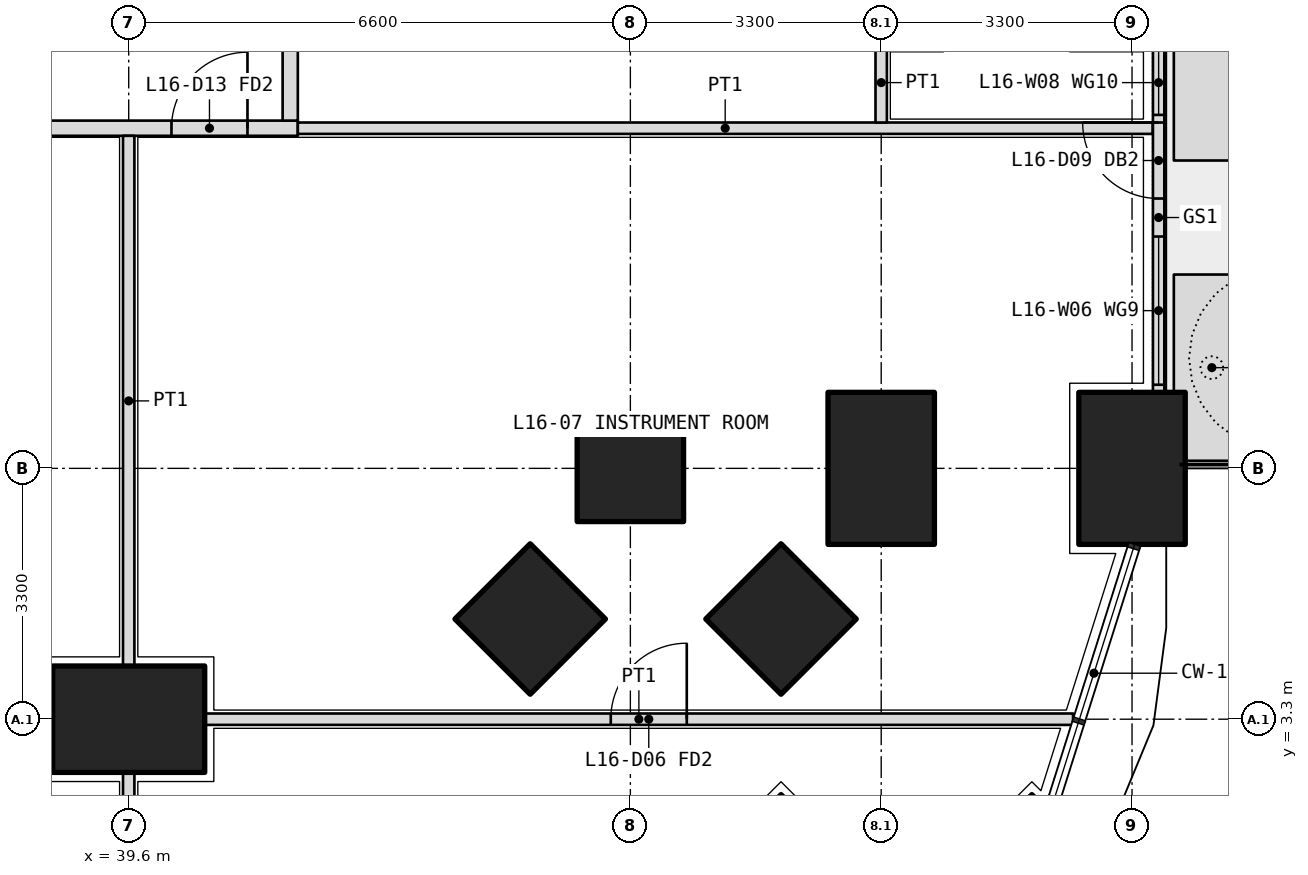
"""IFC4 building model, lengths in metres.
Left out: names, types, materials, properties, quantities, classifications, styles, units other than length and angle.
Written with IfcOpenShell. Run it as: python <this file> out.ifc"""

import sys

from ifc_helpers import new_model, si_unit, direction, frame, frame_2d, origin, origin_2d, place, context, subcontext, project, spatial, polyline, rectangle, outline, extrude, element, fill, save


model = new_model("IFC4")
c1 = context("Model", 3, precision=1e-05, world=origin(), true_north=direction((0.0, 1.0)))
c2 = subcontext(c1, "Body", "Model", "MODEL_VIEW")
j1 = project(units=[si_unit("LENGTHUNIT", "METRE"), si_unit("PLANEANGLEUNIT", "RADIAN")], contexts=[c1])
p1 = place(None, origin())
s1 = spatial("IfcSite", under=j1, at=p1, CompositionType="ELEMENT")
p2 = place(p1, origin())
s2 = spatial("IfcBuilding", under=s1, at=p2, CompositionType="ELEMENT")
p3 = place(p2, frame((0.0, 0.0, 71.7)))
s3 = spatial("IfcBuildingStorey", under=s2, at=p3, CompositionType="ELEMENT", Elevation=71.7)
p4 = place(p3, frame((51.482, 1.318, 0.0), z_axis=(0.0, 0.0, 1.0), x_axis=(0.707106781187, 0.707106781187, 0.0)))
e1 = element("IfcColumn", 1, at=p4, inside=s3, PredefinedType="COLUMN", context=c2, shape_type="SweptSolid", body=[
    extrude(rectangle(XDim=1.4, YDim=1.4, at=origin_2d()), origin(), (0.0, 0.0, 1.0), 4.2),
])
p5 = place(p3, frame((52.8, 6.6, 0.0), z_axis=(0.0, 0.0, 1.0), x_axis=(0.0, 1.0, 0.0)))
e2 = element("IfcColumn", 2, at=p5, inside=s3, PredefinedType="COLUMN", context=c2, shape_type="SweptSolid", body=[
    extrude(rectangle(XDim=2.0, YDim=1.4, at=origin_2d()), origin(), (0.0, 0.0, 1.0), 4.2),
])
for number, where, z_axis, x_axis in (
    (3, (46.2, 6.6, 0.0), (0.0, 0.0, 1.0), (1.0, 0.0, 0.0)),
    (4, (48.182, 1.318, 0.0), (0.0, 0.0, 1.0), (0.707, 0.707, 0.0)),
):
    element("IfcColumn", number, at=place(p3, frame(where, z_axis=z_axis, x_axis=x_axis)), inside=s3, PredefinedType="COLUMN", context=c2, shape_type="SweptSolid", body=[
        extrude(rectangle(XDim=1.4, YDim=1.4, at=origin_2d()), origin(), (0.0, 0.0, 1.0), 4.2),
    ])
p6 = place(p3, frame((49.5, 6.6, 0.0), z_axis=(0.0, 0.0, 1.0), x_axis=(0.0, 1.0, 0.0)))
e5 = element("IfcColumn", 5, at=p6, inside=s3, PredefinedType="COLUMN", context=c2, shape_type="SweptSolid", body=[
    extrude(rectangle(XDim=2.0, YDim=1.4, at=origin_2d()), origin(), (0.0, 0.0, 1.0), 4.2),
])
p7 = place(p3, frame((48.182, 4.618, 0.0), z_axis=(0.0, 0.0, 1.0), x_axis=(0.707106781187, 0.707106781187, 0.0)))
e6 = element("IfcColumn", 6, at=p7, inside=s3, PredefinedType="COLUMN", context=c2, shape_type="SweptSolid", body=[
    extrude(rectangle(XDim=1.4, YDim=1.4, at=origin_2d()), origin(), (0.0, 0.0, 1.0), 4.2),
])
p8 = place(p3, frame((39.6, 3.3, 0.0), z_axis=(0.0, 0.0, 1.0), x_axis=(1.0, 0.0, 0.0)))
e7 = element("IfcColumn", 7, at=p8, inside=s3, PredefinedType="COLUMN", context=c2, shape_type="SweptSolid", body=[
    extrude(rectangle(XDim=2.0, YDim=1.4, at=origin_2d()), origin(), (0.0, 0.0, 1.0), 4.2),
])
p9 = place(p3, frame((44.882, 4.618, 0.0), z_axis=(0.0, 0.0, 1.0), x_axis=(0.707106781187, 0.707106781187, 0.0)))
e8 = element("IfcColumn", 8, at=p9, inside=s3, PredefinedType="COLUMN", context=c2, shape_type="SweptSolid", body=[
    extrude(rectangle(XDim=1.4, YDim=1.4, at=origin_2d()), origin(), (0.0, 0.0, 1.0), 4.2),
])
p10 = place(p3, origin())
e9 = element("IfcWall", 9, at=p10, inside=s3, PredefinedType="USERDEFINED", context=c2, shape_type="SweptSolid", body=[
    extrude(outline(polyline([(53.35, 6.7), (54.35, 6.7), (54.35, 9.15), (53.35, 9.15), (53.35, 6.7)]), holes=[polyline([(53.5, 6.85), (54.2, 6.85), (54.2, 9.0), (53.5, 9.0), (53.5, 6.85)])]), origin(), (0.0, 0.0, 1.0), 1.05),
])
p11 = place(p3, origin())
e10 = element("IfcWall", 10, at=p11, inside=s3, PredefinedType="USERDEFINED", context=c2, shape_type="SweptSolid", body=[
    extrude(outline(polyline([(53.35, 10.65), (54.35, 10.65), (54.35, 19.7), (53.35, 19.7), (53.35, 10.65)]), holes=[polyline([(53.5, 10.8), (54.2, 10.8), (54.2, 19.55), (53.5, 19.55), (53.5, 10.8)])]), origin(), (0.0, 0.0, 1.0), 1.05),
])
p12 = place(p3, frame((53.15, 7.6, 0.0), z_axis=(0.0, 0.0, 1.0), x_axis=(0.0, 1.0, 0.0)))
e11 = element("IfcWall", 11, at=p12, inside=s3, PredefinedType="SOLIDWALL", context=c2, shape_type="SweptSolid", body=[
    extrude(rectangle(XDim=4.6, YDim=0.15, at=frame_2d((2.3, 0.0))), origin(), (0.0, 0.0, 1.0), 2.05),
])
p13 = place(p12, frame((2.55, 0.0, 0.0)))
e12 = element("IfcOpeningElement", 12, at=p13, cuts=e11, PredefinedType="OPENING", context=c2, shape_type="SweptSolid", body=[
    extrude(rectangle(XDim=1.0, YDim=2.0, at=frame_2d((0.5, 1.0))), frame((0.0, 0.085, 0.0), z_axis=(0.0, -1.0, 0.0), x_axis=(1.0, 0.0, 0.0)), (0.0, 0.0, 1.0), 0.17),
])
p14 = place(p12, frame((0.1, 0.0, 0.1)))
e13 = element("IfcOpeningElement", 13, at=p14, cuts=e11, PredefinedType="OPENING", context=c2, shape_type="SweptSolid", body=[
    extrude(rectangle(XDim=1.95, YDim=1.65, at=frame_2d((0.975, 0.825))), frame((0.0, 0.085, 0.0), z_axis=(0.0, -1.0, 0.0), x_axis=(1.0, 0.0, 0.0)), (0.0, 0.0, 1.0), 0.17),
])
p15 = place(p12, frame((3.65, 0.0, 0.1)))
e14 = element("IfcOpeningElement", 14, at=p15, cuts=e11, PredefinedType="OPENING", context=c2, shape_type="SweptSolid", body=[
    extrude(rectangle(XDim=0.85, YDim=1.65, at=frame_2d((0.425, 0.825))), frame((0.0, 0.085, 0.0), z_axis=(0.0, -1.0, 0.0), x_axis=(1.0, 0.0, 0.0)), (0.0, 0.0, 1.0), 0.17),
])
p16 = place(p3, frame((10.975, 11.075, 0.0), z_axis=(0.0, 0.0, 1.0), x_axis=(1.0, 0.0, 0.0)))
e15 = element("IfcWall", 15, at=p16, inside=s3, PredefinedType="PARTITIONING", context=c2, shape_type="SweptSolid", body=[
    extrude(rectangle(XDim=30.85, YDim=0.2, at=frame_2d((15.425, 0.0))), origin(), (0.0, 0.0, 1.0), 2.55),
])
p17 = place(p16, frame((2.312, 0.0, 0.0)))
e16 = element("IfcOpeningElement", 16, at=p17, cuts=e15, PredefinedType="OPENING", context=c2, shape_type="SweptSolid", body=[
    extrude(rectangle(XDim=1.0, YDim=2.1, at=frame_2d((0.5, 1.05))), frame((0.0, 0.11, 0.0), z_axis=(0.0, -1.0, 0.0), x_axis=(1.0, 0.0, 0.0)), (0.0, 0.0, 1.0), 0.22),
])
p18 = place(p16, frame((11.625, 0.0, 0.0)))
e17 = element("IfcOpeningElement", 17, at=p18, cuts=e15, PredefinedType="OPENING", context=c2, shape_type="SweptSolid", body=[
    extrude(rectangle(XDim=1.0, YDim=2.1, at=frame_2d((0.5, 1.05))), frame((0.0, 0.11, 0.0), z_axis=(0.0, -1.0, 0.0), x_axis=(1.0, 0.0, 0.0)), (0.0, 0.0, 1.0), 0.22),
])
p19 = place(p16, frame((23.075, 0.0, 0.0)))
e18 = element("IfcOpeningElement", 18, at=p19, cuts=e15, PredefinedType="OPENING", context=c2, shape_type="SweptSolid", body=[
    extrude(rectangle(XDim=1.2, YDim=2.1, at=frame_2d((0.6, 1.05))), frame((0.0, 0.11, 0.0), z_axis=(0.0, -1.0, 0.0), x_axis=(1.0, 0.0, 0.0)), (0.0, 0.0, 1.0), 0.22),
])
p20 = place(p16, frame((29.188, 0.0, 0.0)))
e19 = element("IfcOpeningElement", 19, at=p20, cuts=e15, PredefinedType="OPENING", context=c2, shape_type="SweptSolid", body=[
    extrude(rectangle(XDim=1.0, YDim=2.1, at=frame_2d((0.5, 1.05))), frame((0.0, 0.11, 0.0), z_axis=(0.0, -1.0, 0.0), x_axis=(1.0, 0.0, 0.0)), (0.0, 0.0, 1.0), 0.22),
])
p21 = place(p3, frame((41.725, 11.175, 0.0), z_axis=(0.0, 0.0, 1.0), x_axis=(0.0, 1.0, 0.0)))
e20 = element("IfcWall", 20, at=p21, inside=s3, PredefinedType="PARTITIONING", context=c2, shape_type="SweptSolid", body=[
    extrude(rectangle(XDim=23.85, YDim=0.2, at=frame_2d((11.925, 0.0))), origin(), (0.0, 0.0, 1.0), 2.55),
])
p22 = place(p21, frame((3.762, 0.0, 0.0)))
e21 = element("IfcOpeningElement", 21, at=p22, cuts=e20, PredefinedType="OPENING", context=c2, shape_type="SweptSolid", body=[
    extrude(rectangle(XDim=1.0, YDim=2.1, at=frame_2d((0.5, 1.05))), frame((0.0, 0.11, 0.0), z_axis=(0.0, -1.0, 0.0), x_axis=(1.0, 0.0, 0.0)), (0.0, 0.0, 1.0), 0.22),
])
p23 = place(p21, frame((9.625, 0.0, 0.0)))
e22 = element("IfcOpeningElement", 22, at=p23, cuts=e20, PredefinedType="OPENING", context=c2, shape_type="SweptSolid", body=[
    extrude(rectangle(XDim=1.0, YDim=2.1, at=frame_2d((0.5, 1.05))), frame((0.0, 0.11, 0.0), z_axis=(0.0, -1.0, 0.0), x_axis=(1.0, 0.0, 0.0)), (0.0, 0.0, 1.0), 0.22),
])
p24 = place(p21, frame((12.975, 0.0, 0.0)))
e23 = element("IfcOpeningElement", 23, at=p24, cuts=e20, PredefinedType="OPENING", context=c2, shape_type="SweptSolid", body=[
    extrude(rectangle(XDim=0.9, YDim=2.1, at=frame_2d((0.45, 1.05))), frame((0.0, 0.11, 0.0), z_axis=(0.0, -1.0, 0.0), x_axis=(1.0, 0.0, 0.0)), (0.0, 0.0, 1.0), 0.22),
])
p25 = place(p21, frame((16.275, 0.0, 0.0)))
e24 = element("IfcOpeningElement", 24, at=p25, cuts=e20, PredefinedType="OPENING", context=c2, shape_type="SweptSolid", body=[
    extrude(rectangle(XDim=1.2, YDim=2.1, at=frame_2d((0.6, 1.05))), frame((0.0, 0.11, 0.0), z_axis=(0.0, -1.0, 0.0), x_axis=(1.0, 0.0, 0.0)), (0.0, 0.0, 1.0), 0.22),
])
p26 = place(p21, frame((19.575, 0.0, 0.0)))
e25 = element("IfcOpeningElement", 25, at=p26, cuts=e20, PredefinedType="OPENING", context=c2, shape_type="SweptSolid", body=[
    extrude(rectangle(XDim=1.2, YDim=2.1, at=frame_2d((0.6, 1.05))), frame((0.0, 0.11, 0.0), z_axis=(0.0, -1.0, 0.0), x_axis=(1.0, 0.0, 0.0)), (0.0, 0.0, 1.0), 0.22),
])
p27 = place(p21, frame((22.288, 0.0, 0.0)))
e26 = element("IfcOpeningElement", 26, at=p27, cuts=e20, PredefinedType="OPENING", context=c2, shape_type="SweptSolid", body=[
    extrude(rectangle(XDim=1.2, YDim=2.1, at=frame_2d((0.6, 1.05))), frame((0.0, 0.11, 0.0), z_axis=(0.0, -1.0, 0.0), x_axis=(1.0, 0.0, 0.0)), (0.0, 0.0, 1.0), 0.22),
])
p28 = place(p3, frame((53.07, 11.075, 0.0), z_axis=(0.0, 0.0, 1.0), x_axis=(-1.0, 0.0, 0.0)))
e27 = element("IfcWall", 27, at=p28, inside=s3, PredefinedType="PARTITIONING", context=c2, shape_type="SweptSolid", body=[
    extrude(rectangle(XDim=11.245, YDim=0.15, at=frame_2d((5.623, 0.0))), origin(), (0.0, 0.0, 1.0), 3.85),
])
p29 = place(p3, frame((40.6, 3.3, 0.0), z_axis=(0.0, 0.0, 1.0), x_axis=(1.0, 0.0, 0.0)))
e28 = element("IfcWall", 28, at=p29, inside=s3, PredefinedType="PARTITIONING", context=c2, shape_type="SweptSolid", body=[
    extrude(rectangle(XDim=11.424, YDim=0.15, at=frame_2d((5.712, 0.0))), origin(), (0.0, 0.0, 1.0), 3.85),
])
p30 = place(p29, frame((5.342, 0.0, 0.0)))
e29 = element("IfcOpeningElement", 29, at=p30, cuts=e28, PredefinedType="OPENING", context=c2, shape_type="SweptSolid", body=[
    extrude(rectangle(XDim=1.0, YDim=2.1, at=frame_2d((0.5, 1.05))), frame((0.0, 0.085, 0.0), z_axis=(0.0, -1.0, 0.0), x_axis=(1.0, 0.0, 0.0)), (0.0, 0.0, 1.0), 0.17),
])
p31 = place(p3, frame((39.6, 0.7, 0.0), z_axis=(0.0, 0.0, 1.0), x_axis=(0.0, 1.0, 0.0)))
e30 = element("IfcWall", 30, at=p31, inside=s3, PredefinedType="PARTITIONING", context=c2, shape_type="SweptSolid", body=[
    extrude(rectangle(XDim=1.9, YDim=0.15, at=frame_2d((0.95, 0.0))), origin(), (0.0, 0.0, 1.0), 2.55),
])
p32 = place(p3, frame((39.6, 4.0, 0.0), z_axis=(0.0, 0.0, 1.0), x_axis=(0.0, 1.0, 0.0)))
e31 = element("IfcWall", 31, at=p32, inside=s3, PredefinedType="PARTITIONING", context=c2, shape_type="SweptSolid", body=[
    extrude(rectangle(XDim=6.975, YDim=0.15, at=frame_2d((3.488, 0.0))), origin(), (0.0, 0.0, 1.0), 2.55),
])
p33 = place(p3, frame((49.5, 11.15, 0.0), z_axis=(0.0, 0.0, 1.0), x_axis=(0.0, 1.0, 0.0)))
e32 = element("IfcWall", 32, at=p33, inside=s3, PredefinedType="PARTITIONING", context=c2, shape_type="SweptSolid", body=[
    extrude(rectangle(XDim=1.05, YDim=0.15, at=frame_2d((0.525, 0.0))), origin(), (0.0, 0.0, 1.0), 2.55),
])
p34 = place(p13, origin())
e33 = element("IfcDoor", 33, at=p34, inside=s3, OperationType="SINGLE_SWING_RIGHT", PredefinedType="DOOR", context=c2, shape_type="SweptSolid", body=[
    extrude(rectangle(XDim=1.0, YDim=2.0, at=frame_2d((0.5, 1.0))), frame((0.0, 0.025, 0.0), z_axis=(0.0, -1.0, 0.0), x_axis=(1.0, 0.0, 0.0)), (0.0, 0.0, 1.0), 0.05),
])
fill(e12, e33)
p35 = place(p14, origin())
e34 = element("IfcWindow", 34, at=p35, inside=s3, PartitioningType="SINGLE_PANEL", PredefinedType="WINDOW", context=c2, shape_type="SweptSolid", body=[
    extrude(rectangle(XDim=1.95, YDim=1.65, at=frame_2d((0.975, 0.825))), frame((0.0, 0.03, 0.0), z_axis=(0.0, -1.0, 0.0), x_axis=(1.0, 0.0, 0.0)), (0.0, 0.0, 1.0), 0.06),
])
fill(e13, e34)
p36 = place(p15, origin())
e35 = element("IfcWindow", 35, at=p36, inside=s3, PartitioningType="SINGLE_PANEL", PredefinedType="WINDOW", context=c2, shape_type="SweptSolid", body=[
    extrude(rectangle(XDim=0.85, YDim=1.65, at=frame_2d((0.425, 0.825))), frame((0.0, 0.03, 0.0), z_axis=(0.0, -1.0, 0.0), x_axis=(1.0, 0.0, 0.0)), (0.0, 0.0, 1.0), 0.06),
])
fill(e14, e35)
p37 = place(p20, origin())
e36 = element("IfcDoor", 36, at=p37, inside=s3, OperationType="SINGLE_SWING_RIGHT", PredefinedType="DOOR", context=c2, shape_type="SweptSolid", body=[
    extrude(rectangle(XDim=1.0, YDim=2.1, at=frame_2d((0.5, 1.05))), frame((0.0, 0.025, 0.0), z_axis=(0.0, -1.0, 0.0), x_axis=(1.0, 0.0, 0.0)), (0.0, 0.0, 1.0), 0.05),
])
fill(e19, e36)
p38 = place(p30, origin())
e37 = element("IfcDoor", 37, at=p38, inside=s3, OperationType="SINGLE_SWING_RIGHT", PredefinedType="DOOR", context=c2, shape_type="SweptSolid", body=[
    extrude(rectangle(XDim=1.0, YDim=2.1, at=frame_2d((0.5, 1.05))), frame((0.0, 0.025, 0.0), z_axis=(0.0, -1.0, 0.0), x_axis=(1.0, 0.0, 0.0)), (0.0, 0.0, 1.0), 0.05),
])
fill(e29, e37)
save(model, sys.argv[1])
